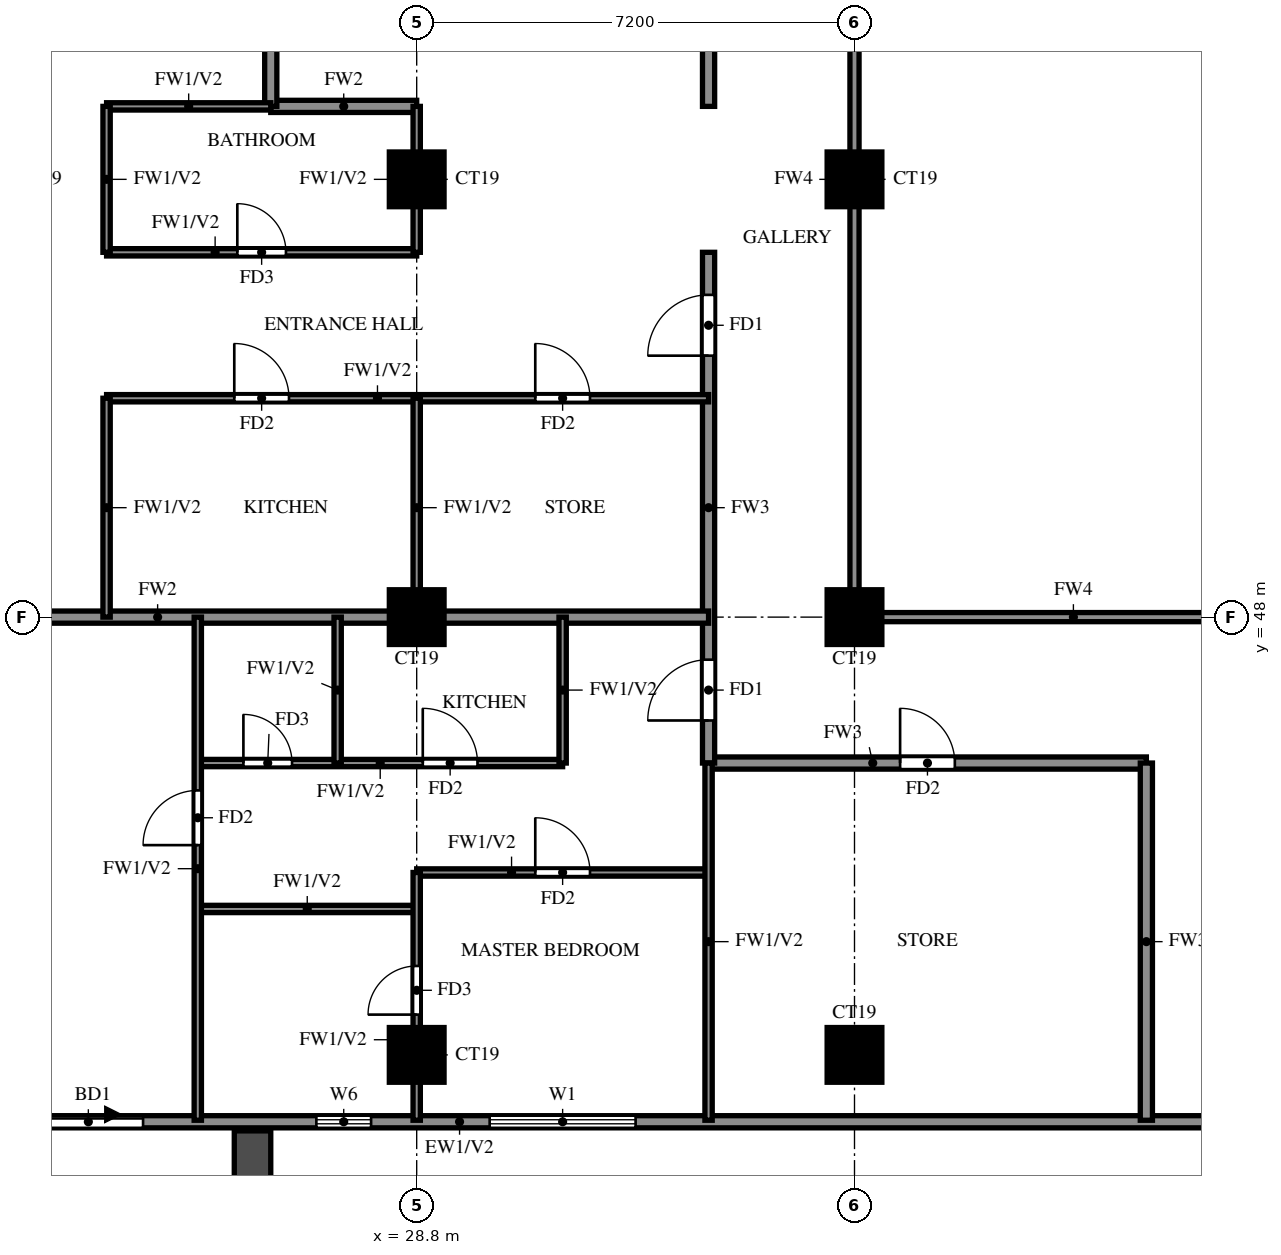
"""IFC4 building model, lengths in metres.
Left out: names, types, materials, properties, quantities, classifications, styles, units other than length and angle.
Written with IfcOpenShell. Run it as: python <this file> out.ifc"""

import sys

from ifc_helpers import new_model, si_unit, direction, frame, frame_2d, origin, origin_2d, place, context, subcontext, project, spatial, rectangle, extrude, source, transform, mapped, element, fill, save


model = new_model("IFC4")
c1 = context("Model", 3, precision=1e-05, world=origin(), true_north=direction((0.0, 1.0)))
c2 = subcontext(c1, "Body", "Model", "MODEL_VIEW")
j1 = project(units=[si_unit("LENGTHUNIT", "METRE"), si_unit("PLANEANGLEUNIT", "RADIAN")], contexts=[c1])
p1 = place(None, origin())
s1 = spatial("IfcSite", under=j1, at=p1, CompositionType="ELEMENT")
p2 = place(p1, origin())
s2 = spatial("IfcBuilding", under=s1, at=p2, CompositionType="ELEMENT")
p3 = place(p2, frame((0.0, 0.0, 192.0)))
s3 = spatial("IfcBuildingStorey", under=s2, at=p3, CompositionType="ELEMENT", Elevation=192.0)
m1 = source(origin(), c2, "Body", "SweptSolid", [
    extrude(rectangle(XDim=0.9, YDim=0.9, at=origin_2d()), origin(), (0.0, 0.0, 1.0), 3.2),
])
for number, where, z_axis, x_axis in (
    (1, (28.8, 40.8, 0.0), (0.0, 0.0, 1.0), (1.0, 0.0, 0.0)),
    (2, (36.0, 40.8, 0.0), (0.0, 0.0, 1.0), (1.0, 0.0, 0.0)),
    (3, (28.8, 48.0, 0.0), (0.0, 0.0, 1.0), (1.0, 0.0, 0.0)),
    (4, (36.0, 48.0, 0.0), (0.0, 0.0, 1.0), (1.0, 0.0, 0.0)),
    (5, (28.8, 55.2, 0.0), (0.0, 0.0, 1.0), (1.0, 0.0, 0.0)),
    (6, (36.0, 55.2, 0.0), (0.0, 0.0, 1.0), (1.0, 0.0, 0.0)),
):
    element("IfcColumn", number, at=place(p3, frame(where, z_axis=z_axis, x_axis=x_axis)), inside=s3, PredefinedType="COLUMN", context=c2, shape_type="MappedRepresentation", body=[
        mapped(m1, transform((0.0, 0.0, 0.0))),
    ])
p4 = place(p3, frame((18.2, 39.7, 0.0), z_axis=(0.0, 0.0, 1.0), x_axis=(1.0, 0.0, 0.0)))
e7 = element("IfcWall", 7, at=p4, inside=s3, PredefinedType="SOLIDWALL", context=c2, shape_type="SweptSolid", body=[
    extrude(rectangle(XDim=23.8, YDim=0.2, at=frame_2d((11.9, 0.0))), origin(), (0.0, 0.0, 1.0), 3.2),
])
p5 = place(p4, frame((4.3, 0.0, 0.0)))
e8 = element("IfcOpeningElement", 8, at=p5, cuts=e7, PredefinedType="OPENING", context=c2, shape_type="SweptSolid", body=[
    extrude(rectangle(XDim=1.8, YDim=2.4, at=frame_2d((0.9, 1.2))), frame((0.0, 0.11, 0.0), z_axis=(0.0, -1.0, 0.0), x_axis=(1.0, 0.0, 0.0)), (0.0, 0.0, 1.0), 0.22),
])
p6 = place(p4, frame((1.9, 0.0, 0.6)))
e9 = element("IfcOpeningElement", 9, at=p6, cuts=e7, PredefinedType="OPENING", context=c2, shape_type="SweptSolid", body=[
    extrude(rectangle(XDim=1.8, YDim=2.4, at=frame_2d((0.9, 1.2))), frame((0.0, 0.11, 0.0), z_axis=(0.0, -1.0, 0.0), x_axis=(1.0, 0.0, 0.0)), (0.0, 0.0, 1.0), 0.22),
])
p7 = place(p4, frame((11.8, 0.0, 0.6)))
e10 = element("IfcOpeningElement", 10, at=p7, cuts=e7, PredefinedType="OPENING", context=c2, shape_type="SweptSolid", body=[
    extrude(rectangle(XDim=2.4, YDim=2.4, at=frame_2d((1.2, 1.2))), frame((0.0, 0.11, 0.0), z_axis=(0.0, -1.0, 0.0), x_axis=(1.0, 0.0, 0.0)), (0.0, 0.0, 1.0), 0.22),
])
p8 = place(p4, frame((8.95, 0.0, 1.5)))
e11 = element("IfcOpeningElement", 11, at=p8, cuts=e7, PredefinedType="OPENING", context=c2, shape_type="SweptSolid", body=[
    extrude(rectangle(XDim=0.9, YDim=0.9, at=frame_2d((0.45, 0.45))), frame((0.0, 0.11, 0.0), z_axis=(0.0, -1.0, 0.0), x_axis=(1.0, 0.0, 0.0)), (0.0, 0.0, 1.0), 0.22),
])
p9 = place(p3, frame((26.1, 39.55, 0.0), z_axis=(0.0, 0.0, 1.0), x_axis=(0.0, -1.0, 0.0)))
e12 = element("IfcWall", 12, at=p9, inside=s3, PredefinedType="SOLIDWALL", context=c2, shape_type="SweptSolid", body=[
    extrude(rectangle(XDim=2.65, YDim=0.6, at=frame_2d((1.325, 0.0))), origin(), (0.0, 0.0, 1.0), 2.85),
])
p10 = place(p3, frame((33.6, 45.6, 0.0), z_axis=(0.0, 0.0, 1.0), x_axis=(1.0, 0.0, 0.0)))
e13 = element("IfcWall", 13, at=p10, inside=s3, PredefinedType="SOLIDWALL", context=c2, shape_type="SweptSolid", body=[
    extrude(rectangle(XDim=7.2, YDim=0.2, at=frame_2d((3.6, 0.0))), origin(), (0.0, 0.0, 1.0), 3.2),
])
p11 = place(p10, frame((3.15, 0.0, 0.0)))
e14 = element("IfcOpeningElement", 14, at=p11, cuts=e13, PredefinedType="OPENING", context=c2, shape_type="SweptSolid", body=[
    extrude(rectangle(XDim=0.9, YDim=2.1, at=frame_2d((0.45, 1.05))), frame((0.0, 0.11, 0.0), z_axis=(0.0, -1.0, 0.0), x_axis=(1.0, 0.0, 0.0)), (0.0, 0.0, 1.0), 0.22),
])
p12 = place(p3, frame((33.6, 45.6, 0.0), z_axis=(0.0, 0.0, 1.0), x_axis=(0.0, 1.0, 0.0)))
e15 = element("IfcWall", 15, at=p12, inside=s3, PredefinedType="SOLIDWALL", context=c2, shape_type="SweptSolid", body=[
    extrude(rectangle(XDim=8.4, YDim=0.2, at=frame_2d((4.2, 0.0))), origin(), (0.0, 0.0, 1.0), 3.2),
])
p13 = place(p12, frame((0.7, 0.0, 0.0)))
e16 = element("IfcOpeningElement", 16, at=p13, cuts=e15, PredefinedType="OPENING", context=c2, shape_type="SweptSolid", body=[
    extrude(rectangle(XDim=1.0, YDim=2.1, at=frame_2d((0.5, 1.05))), frame((0.0, 0.11, 0.0), z_axis=(0.0, -1.0, 0.0), x_axis=(1.0, 0.0, 0.0)), (0.0, 0.0, 1.0), 0.22),
])
p14 = place(p12, frame((6.7, 0.0, 0.0)))
e17 = element("IfcOpeningElement", 17, at=p14, cuts=e15, PredefinedType="OPENING", context=c2, shape_type="SweptSolid", body=[
    extrude(rectangle(XDim=1.0, YDim=2.1, at=frame_2d((0.5, 1.05))), frame((0.0, 0.11, 0.0), z_axis=(0.0, -1.0, 0.0), x_axis=(1.0, 0.0, 0.0)), (0.0, 0.0, 1.0), 0.22),
])
p15 = place(p3, frame((33.6, 56.4, 0.0), z_axis=(0.0, 0.0, 1.0), x_axis=(0.0, 1.0, 0.0)))
e18 = element("IfcWall", 18, at=p15, inside=s3, PredefinedType="SOLIDWALL", context=c2, shape_type="SweptSolid", body=[
    extrude(rectangle(XDim=6.0, YDim=0.2, at=frame_2d((3.0, 0.0))), origin(), (0.0, 0.0, 1.0), 3.2),
])
p16 = place(p15, frame((3.7, 0.0, 0.0)))
e19 = element("IfcOpeningElement", 19, at=p16, cuts=e18, PredefinedType="OPENING", context=c2, shape_type="SweptSolid", body=[
    extrude(rectangle(XDim=1.0, YDim=2.1, at=frame_2d((0.5, 1.05))), frame((0.0, 0.11, 0.0), z_axis=(0.0, -1.0, 0.0), x_axis=(1.0, 0.0, 0.0)), (0.0, 0.0, 1.0), 0.22),
])
p17 = place(p3, frame((40.8, 39.725, 0.0), z_axis=(0.0, 0.0, 1.0), x_axis=(0.0, 1.0, 0.0)))
e20 = element("IfcWall", 20, at=p17, inside=s3, PredefinedType="SOLIDWALL", context=c2, shape_type="SweptSolid", body=[
    extrude(rectangle(XDim=5.875, YDim=0.2, at=frame_2d((2.938, 0.0))), origin(), (0.0, 0.0, 1.0), 3.2),
])
p18 = place(p3, frame((14.525, 48.0, 0.0), z_axis=(0.0, 0.0, 1.0), x_axis=(1.0, 0.0, 0.0)))
e21 = element("IfcWall", 21, at=p18, inside=s3, PredefinedType="SOLIDWALL", context=c2, shape_type="SweptSolid", body=[
    extrude(rectangle(XDim=19.075, YDim=0.2, at=frame_2d((9.538, 0.0))), origin(), (0.0, 0.0, 1.0), 3.2),
])
for number, where, z_axis, x_axis in (
    (22, (26.4, 56.4, 0.0), (0.0, 0.0, 1.0), (1.0, 0.0, 0.0)),
    (23, (26.4, 56.4, 0.0), (0.0, 0.0, 1.0), (0.0, 1.0, 0.0)),
):
    element("IfcWall", number, at=place(p3, frame(where, z_axis=z_axis, x_axis=x_axis)), inside=s3, PredefinedType="SOLIDWALL", context=c2, shape_type="SweptSolid", body=[
        extrude(rectangle(XDim=2.4, YDim=0.2, at=frame_2d((1.2, 0.0))), origin(), (0.0, 0.0, 1.0), 3.2),
    ])
p19 = place(p3, frame((25.2, 43.2, 0.0), z_axis=(0.0, 0.0, 1.0), x_axis=(1.0, 0.0, 0.0)))
e24 = element("IfcWall", 24, at=p19, inside=s3, PredefinedType="PARTITIONING", context=c2, shape_type="SweptSolid", body=[
    extrude(rectangle(XDim=3.6, YDim=0.12, at=frame_2d((1.8, 0.0))), origin(), (0.0, 0.0, 1.0), 3.2),
])
p20 = place(p3, frame((28.8, 43.8, 0.0), z_axis=(0.0, 0.0, 1.0), x_axis=(1.0, 0.0, 0.0)))
e25 = element("IfcWall", 25, at=p20, inside=s3, PredefinedType="PARTITIONING", context=c2, shape_type="SweptSolid", body=[
    extrude(rectangle(XDim=4.8, YDim=0.12, at=frame_2d((2.4, 0.0))), origin(), (0.0, 0.0, 1.0), 3.2),
])
p21 = place(p20, frame((1.95, 0.0, 0.0)))
e26 = element("IfcOpeningElement", 26, at=p21, cuts=e25, PredefinedType="OPENING", context=c2, shape_type="SweptSolid", body=[
    extrude(rectangle(XDim=0.9, YDim=2.1, at=frame_2d((0.45, 1.05))), frame((0.0, 0.07, 0.0), z_axis=(0.0, -1.0, 0.0), x_axis=(1.0, 0.0, 0.0)), (0.0, 0.0, 1.0), 0.14),
])
p22 = place(p3, frame((25.2, 45.6, 0.0), z_axis=(0.0, 0.0, 1.0), x_axis=(1.0, 0.0, 0.0)))
e27 = element("IfcWall", 27, at=p22, inside=s3, PredefinedType="PARTITIONING", context=c2, shape_type="SweptSolid", body=[
    extrude(rectangle(XDim=6.0, YDim=0.12, at=frame_2d((3.0, 0.0))), origin(), (0.0, 0.0, 1.0), 3.2),
])
p23 = place(p22, frame((0.75, 0.0, 0.0)))
e28 = element("IfcOpeningElement", 28, at=p23, cuts=e27, PredefinedType="OPENING", context=c2, shape_type="SweptSolid", body=[
    extrude(rectangle(XDim=0.8, YDim=2.1, at=frame_2d((0.4, 1.05))), frame((0.0, 0.07, 0.0), z_axis=(0.0, -1.0, 0.0), x_axis=(1.0, 0.0, 0.0)), (0.0, 0.0, 1.0), 0.14),
])
p24 = place(p22, frame((3.7, 0.0, 0.0)))
e29 = element("IfcOpeningElement", 29, at=p24, cuts=e27, PredefinedType="OPENING", context=c2, shape_type="SweptSolid", body=[
    extrude(rectangle(XDim=0.9, YDim=2.1, at=frame_2d((0.45, 1.05))), frame((0.0, 0.07, 0.0), z_axis=(0.0, -1.0, 0.0), x_axis=(1.0, 0.0, 0.0)), (0.0, 0.0, 1.0), 0.14),
])
p25 = place(p3, frame((23.7, 51.6, 0.0), z_axis=(0.0, 0.0, 1.0), x_axis=(1.0, 0.0, 0.0)))
e30 = element("IfcWall", 30, at=p25, inside=s3, PredefinedType="PARTITIONING", context=c2, shape_type="SweptSolid", body=[
    extrude(rectangle(XDim=9.9, YDim=0.12, at=frame_2d((4.95, 0.0))), origin(), (0.0, 0.0, 1.0), 3.2),
])
p26 = place(p25, frame((2.1, 0.0, 0.0)))
e31 = element("IfcOpeningElement", 31, at=p26, cuts=e30, PredefinedType="OPENING", context=c2, shape_type="SweptSolid", body=[
    extrude(rectangle(XDim=0.9, YDim=2.1, at=frame_2d((0.45, 1.05))), frame((0.0, 0.07, 0.0), z_axis=(0.0, -1.0, 0.0), x_axis=(1.0, 0.0, 0.0)), (0.0, 0.0, 1.0), 0.14),
])
p27 = place(p25, frame((7.05, 0.0, 0.0)))
e32 = element("IfcOpeningElement", 32, at=p27, cuts=e30, PredefinedType="OPENING", context=c2, shape_type="SweptSolid", body=[
    extrude(rectangle(XDim=0.9, YDim=2.1, at=frame_2d((0.45, 1.05))), frame((0.0, 0.07, 0.0), z_axis=(0.0, -1.0, 0.0), x_axis=(1.0, 0.0, 0.0)), (0.0, 0.0, 1.0), 0.14),
])
p28 = place(p3, frame((23.7, 54.0, 0.0), z_axis=(0.0, 0.0, 1.0), x_axis=(1.0, 0.0, 0.0)))
e33 = element("IfcWall", 33, at=p28, inside=s3, PredefinedType="PARTITIONING", context=c2, shape_type="SweptSolid", body=[
    extrude(rectangle(XDim=5.1, YDim=0.12, at=frame_2d((2.55, 0.0))), origin(), (0.0, 0.0, 1.0), 3.2),
])
p29 = place(p28, frame((2.15, 0.0, 0.0)))
e34 = element("IfcOpeningElement", 34, at=p29, cuts=e33, PredefinedType="OPENING", context=c2, shape_type="SweptSolid", body=[
    extrude(rectangle(XDim=0.8, YDim=2.1, at=frame_2d((0.4, 1.05))), frame((0.0, 0.07, 0.0), z_axis=(0.0, -1.0, 0.0), x_axis=(1.0, 0.0, 0.0)), (0.0, 0.0, 1.0), 0.14),
])
p30 = place(p3, frame((23.7, 56.4, 0.0), z_axis=(0.0, 0.0, 1.0), x_axis=(1.0, 0.0, 0.0)))
e35 = element("IfcWall", 35, at=p30, inside=s3, PredefinedType="PARTITIONING", context=c2, shape_type="SweptSolid", body=[
    extrude(rectangle(XDim=2.7, YDim=0.12, at=frame_2d((1.35, 0.0))), origin(), (0.0, 0.0, 1.0), 3.2),
])
p31 = place(p3, frame((23.7, 48.0, 0.0), z_axis=(0.0, 0.0, 1.0), x_axis=(0.0, 1.0, 0.0)))
e36 = element("IfcWall", 36, at=p31, inside=s3, PredefinedType="PARTITIONING", context=c2, shape_type="SweptSolid", body=[
    extrude(rectangle(XDim=3.6, YDim=0.12, at=frame_2d((1.8, 0.0))), origin(), (0.0, 0.0, 1.0), 3.2),
])
p32 = place(p3, frame((23.7, 54.0, 0.0), z_axis=(0.0, 0.0, 1.0), x_axis=(0.0, 1.0, 0.0)))
e37 = element("IfcWall", 37, at=p32, inside=s3, PredefinedType="PARTITIONING", context=c2, shape_type="SweptSolid", body=[
    extrude(rectangle(XDim=2.4, YDim=0.12, at=frame_2d((1.2, 0.0))), origin(), (0.0, 0.0, 1.0), 3.2),
])
p33 = place(p3, frame((25.2, 39.725, 0.0), z_axis=(0.0, 0.0, 1.0), x_axis=(0.0, 1.0, 0.0)))
e38 = element("IfcWall", 38, at=p33, inside=s3, PredefinedType="PARTITIONING", context=c2, shape_type="SweptSolid", body=[
    extrude(rectangle(XDim=8.275, YDim=0.12, at=frame_2d((4.137, 0.0))), origin(), (0.0, 0.0, 1.0), 3.2),
])
p34 = place(p33, frame((4.525, 0.0, 0.0)))
e39 = element("IfcOpeningElement", 39, at=p34, cuts=e38, PredefinedType="OPENING", context=c2, shape_type="SweptSolid", body=[
    extrude(rectangle(XDim=0.9, YDim=2.1, at=frame_2d((0.45, 1.05))), frame((0.0, 0.07, 0.0), z_axis=(0.0, -1.0, 0.0), x_axis=(1.0, 0.0, 0.0)), (0.0, 0.0, 1.0), 0.14),
])
p35 = place(p3, frame((27.5, 45.6, 0.0), z_axis=(0.0, 0.0, 1.0), x_axis=(0.0, 1.0, 0.0)))
e40 = element("IfcWall", 40, at=p35, inside=s3, PredefinedType="PARTITIONING", context=c2, shape_type="SweptSolid", body=[
    extrude(rectangle(XDim=2.4, YDim=0.12, at=frame_2d((1.2, 0.0))), origin(), (0.0, 0.0, 1.0), 3.2),
])
p36 = place(p3, frame((28.8, 39.725, 0.0), z_axis=(0.0, 0.0, 1.0), x_axis=(0.0, 1.0, 0.0)))
e41 = element("IfcWall", 41, at=p36, inside=s3, PredefinedType="PARTITIONING", context=c2, shape_type="SweptSolid", body=[
    extrude(rectangle(XDim=4.075, YDim=0.12, at=frame_2d((2.038, 0.0))), origin(), (0.0, 0.0, 1.0), 3.2),
])
p37 = place(p36, frame((1.738, 0.0, 0.0)))
e42 = element("IfcOpeningElement", 42, at=p37, cuts=e41, PredefinedType="OPENING", context=c2, shape_type="SweptSolid", body=[
    extrude(rectangle(XDim=0.8, YDim=2.1, at=frame_2d((0.4, 1.05))), frame((0.0, 0.07, 0.0), z_axis=(0.0, -1.0, 0.0), x_axis=(1.0, 0.0, 0.0)), (0.0, 0.0, 1.0), 0.14),
])
p38 = place(p3, frame((28.8, 48.0, 0.0), z_axis=(0.0, 0.0, 1.0), x_axis=(0.0, 1.0, 0.0)))
e43 = element("IfcWall", 43, at=p38, inside=s3, PredefinedType="PARTITIONING", context=c2, shape_type="SweptSolid", body=[
    extrude(rectangle(XDim=3.6, YDim=0.12, at=frame_2d((1.8, 0.0))), origin(), (0.0, 0.0, 1.0), 3.2),
])
for number, where, z_axis, x_axis in (
    (44, (28.8, 54.0, 0.0), (0.0, 0.0, 1.0), (0.0, 1.0, 0.0)),
    (45, (31.2, 45.6, 0.0), (0.0, 0.0, 1.0), (0.0, 1.0, 0.0)),
):
    element("IfcWall", number, at=place(p3, frame(where, z_axis=z_axis, x_axis=x_axis)), inside=s3, PredefinedType="PARTITIONING", context=c2, shape_type="SweptSolid", body=[
        extrude(rectangle(XDim=2.4, YDim=0.12, at=frame_2d((1.2, 0.0))), origin(), (0.0, 0.0, 1.0), 3.2),
    ])
p39 = place(p3, frame((33.6, 39.725, 0.0), z_axis=(0.0, 0.0, 1.0), x_axis=(0.0, 1.0, 0.0)))
e46 = element("IfcWall", 46, at=p39, inside=s3, PredefinedType="PARTITIONING", context=c2, shape_type="SweptSolid", body=[
    extrude(rectangle(XDim=5.875, YDim=0.12, at=frame_2d((2.938, 0.0))), origin(), (0.0, 0.0, 1.0), 3.2),
])
p40 = place(p3, frame((36.0, 48.0, 0.0), z_axis=(0.0, 0.0, 1.0), x_axis=(1.0, 0.0, 0.0)))
e47 = element("IfcWall", 47, at=p40, inside=s3, PredefinedType="SOLIDWALL", context=c2, shape_type="SweptSolid", body=[
    extrude(rectangle(XDim=7.2, YDim=0.15, at=frame_2d((3.6, 0.0))), origin(), (0.0, 0.0, 1.0), 2.3),
])
p41 = place(p3, frame((36.0, 48.0, 0.0), z_axis=(0.0, 0.0, 1.0), x_axis=(0.0, 1.0, 0.0)))
e48 = element("IfcWall", 48, at=p41, inside=s3, PredefinedType="SOLIDWALL", context=c2, shape_type="SweptSolid", body=[
    extrude(rectangle(XDim=14.4, YDim=0.15, at=frame_2d((7.2, 0.0))), origin(), (0.0, 0.0, 1.0), 2.3),
])
p42 = place(p5, origin())
e49 = element("IfcDoor", 49, at=p42, inside=s3, OperationType="DOUBLE_DOOR_SLIDING", PredefinedType="DOOR", context=c2, shape_type="SweptSolid", body=[
    extrude(rectangle(XDim=1.8, YDim=2.4, at=frame_2d((0.9, 1.2))), frame((0.0, 0.025, 0.0), z_axis=(0.0, -1.0, 0.0), x_axis=(1.0, 0.0, 0.0)), (0.0, 0.0, 1.0), 0.05),
])
fill(e8, e49)
p43 = place(p7, origin())
e50 = element("IfcWindow", 50, at=p43, inside=s3, PartitioningType="DOUBLE_PANEL_VERTICAL", PredefinedType="WINDOW", context=c2, shape_type="SweptSolid", body=[
    extrude(rectangle(XDim=2.4, YDim=2.4, at=frame_2d((1.2, 1.2))), frame((0.0, 0.03, 0.0), z_axis=(0.0, -1.0, 0.0), x_axis=(1.0, 0.0, 0.0)), (0.0, 0.0, 1.0), 0.06),
])
fill(e10, e50)
p44 = place(p8, origin())
e51 = element("IfcWindow", 51, at=p44, inside=s3, PartitioningType="SINGLE_PANEL", PredefinedType="WINDOW", context=c2, shape_type="SweptSolid", body=[
    extrude(rectangle(XDim=0.9, YDim=0.9, at=frame_2d((0.45, 0.45))), frame((0.0, 0.03, 0.0), z_axis=(0.0, -1.0, 0.0), x_axis=(1.0, 0.0, 0.0)), (0.0, 0.0, 1.0), 0.06),
])
fill(e11, e51)
p45 = place(p13, origin())
e52 = element("IfcDoor", 52, at=p45, inside=s3, OperationType="SINGLE_SWING_RIGHT", PredefinedType="DOOR", context=c2, shape_type="SweptSolid", body=[
    extrude(rectangle(XDim=1.0, YDim=2.1, at=frame_2d((0.5, 1.05))), frame((0.0, 0.025, 0.0), z_axis=(0.0, -1.0, 0.0), x_axis=(1.0, 0.0, 0.0)), (0.0, 0.0, 1.0), 0.05),
])
fill(e16, e52)
p46 = place(p34, origin())
e53 = element("IfcDoor", 53, at=p46, inside=s3, OperationType="SINGLE_SWING_LEFT", PredefinedType="DOOR", context=c2, shape_type="SweptSolid", body=[
    extrude(rectangle(XDim=0.9, YDim=2.1, at=frame_2d((0.45, 1.05))), frame((0.0, 0.025, 0.0), z_axis=(0.0, -1.0, 0.0), x_axis=(1.0, 0.0, 0.0)), (0.0, 0.0, 1.0), 0.05),
])
fill(e39, e53)
p47 = place(p21, origin())
e54 = element("IfcDoor", 54, at=p47, inside=s3, OperationType="SINGLE_SWING_LEFT", PredefinedType="DOOR", context=c2, shape_type="SweptSolid", body=[
    extrude(rectangle(XDim=0.9, YDim=2.1, at=frame_2d((0.45, 1.05))), frame((0.0, 0.025, 0.0), z_axis=(0.0, -1.0, 0.0), x_axis=(1.0, 0.0, 0.0)), (0.0, 0.0, 1.0), 0.05),
])
fill(e26, e54)
p48 = place(p37, origin())
e55 = element("IfcDoor", 55, at=p48, inside=s3, OperationType="SINGLE_SWING_LEFT", PredefinedType="DOOR", context=c2, shape_type="SweptSolid", body=[
    extrude(rectangle(XDim=0.8, YDim=2.1, at=frame_2d((0.4, 1.05))), frame((0.0, 0.025, 0.0), z_axis=(0.0, -1.0, 0.0), x_axis=(1.0, 0.0, 0.0)), (0.0, 0.0, 1.0), 0.05),
])
fill(e42, e55)
p49 = place(p23, origin())
e56 = element("IfcDoor", 56, at=p49, inside=s3, OperationType="SINGLE_SWING_LEFT", PredefinedType="DOOR", context=c2, shape_type="SweptSolid", body=[
    extrude(rectangle(XDim=0.8, YDim=2.1, at=frame_2d((0.4, 1.05))), frame((0.0, 0.025, 0.0), z_axis=(0.0, -1.0, 0.0), x_axis=(1.0, 0.0, 0.0)), (0.0, 0.0, 1.0), 0.05),
])
fill(e28, e56)
p50 = place(p24, origin())
e57 = element("IfcDoor", 57, at=p50, inside=s3, OperationType="SINGLE_SWING_LEFT", PredefinedType="DOOR", context=c2, shape_type="SweptSolid", body=[
    extrude(rectangle(XDim=0.9, YDim=2.1, at=frame_2d((0.45, 1.05))), frame((0.0, 0.025, 0.0), z_axis=(0.0, -1.0, 0.0), x_axis=(1.0, 0.0, 0.0)), (0.0, 0.0, 1.0), 0.05),
])
fill(e29, e57)
p51 = place(p11, origin())
e58 = element("IfcDoor", 58, at=p51, inside=s3, OperationType="SINGLE_SWING_RIGHT", PredefinedType="DOOR", context=c2, shape_type="SweptSolid", body=[
    extrude(rectangle(XDim=0.9, YDim=2.1, at=frame_2d((0.45, 1.05))), frame((0.0, 0.025, 0.0), z_axis=(0.0, -1.0, 0.0), x_axis=(1.0, 0.0, 0.0)), (0.0, 0.0, 1.0), 0.05),
])
fill(e14, e58)
p52 = place(p14, origin())
e59 = element("IfcDoor", 59, at=p52, inside=s3, OperationType="SINGLE_SWING_LEFT", PredefinedType="DOOR", context=c2, shape_type="SweptSolid", body=[
    extrude(rectangle(XDim=1.0, YDim=2.1, at=frame_2d((0.5, 1.05))), frame((0.0, 0.025, 0.0), z_axis=(0.0, -1.0, 0.0), x_axis=(1.0, 0.0, 0.0)), (0.0, 0.0, 1.0), 0.05),
])
fill(e17, e59)
p53 = place(p26, origin())
e60 = element("IfcDoor", 60, at=p53, inside=s3, OperationType="SINGLE_SWING_LEFT", PredefinedType="DOOR", context=c2, shape_type="SweptSolid", body=[
    extrude(rectangle(XDim=0.9, YDim=2.1, at=frame_2d((0.45, 1.05))), frame((0.0, 0.025, 0.0), z_axis=(0.0, -1.0, 0.0), x_axis=(1.0, 0.0, 0.0)), (0.0, 0.0, 1.0), 0.05),
])
fill(e31, e60)
p54 = place(p29, origin())
e61 = element("IfcDoor", 61, at=p54, inside=s3, OperationType="SINGLE_SWING_RIGHT", PredefinedType="DOOR", context=c2, shape_type="SweptSolid", body=[
    extrude(rectangle(XDim=0.8, YDim=2.1, at=frame_2d((0.4, 1.05))), frame((0.0, 0.025, 0.0), z_axis=(0.0, -1.0, 0.0), x_axis=(1.0, 0.0, 0.0)), (0.0, 0.0, 1.0), 0.05),
])
fill(e34, e61)
p55 = place(p27, origin())
e62 = element("IfcDoor", 62, at=p55, inside=s3, OperationType="SINGLE_SWING_LEFT", PredefinedType="DOOR", context=c2, shape_type="SweptSolid", body=[
    extrude(rectangle(XDim=0.9, YDim=2.1, at=frame_2d((0.45, 1.05))), frame((0.0, 0.025, 0.0), z_axis=(0.0, -1.0, 0.0), x_axis=(1.0, 0.0, 0.0)), (0.0, 0.0, 1.0), 0.05),
])
fill(e32, e62)
save(model, sys.argv[1])
